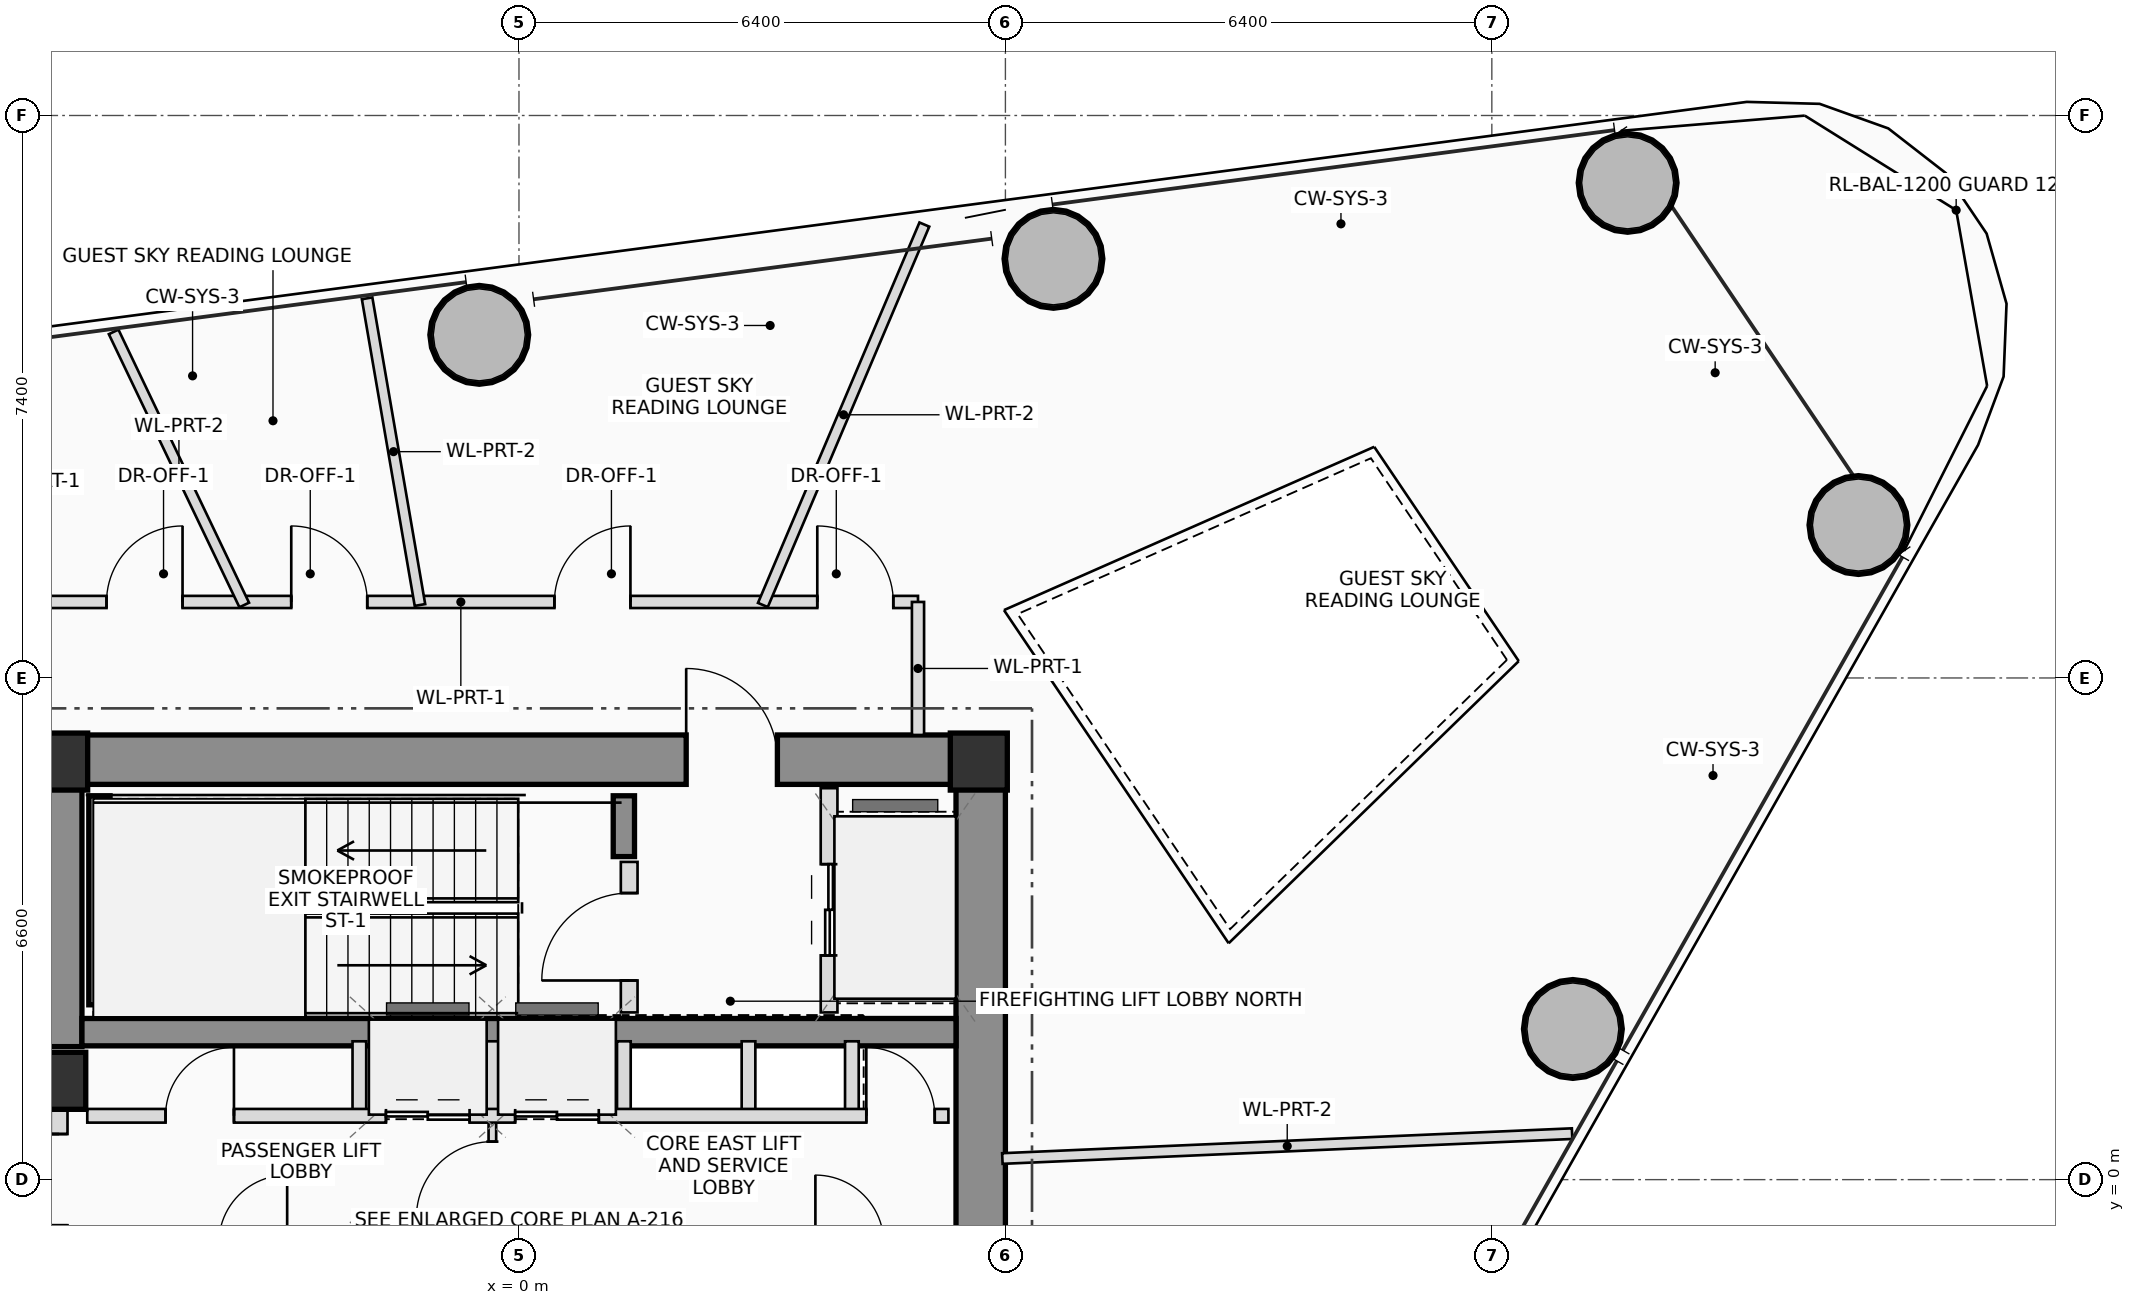
"""IFC4 building model, lengths in metres.
Left out: names, types, materials, properties, quantities, classifications, styles, units other than length and angle.
Written with IfcOpenShell. Run it as: python <this file> out.ifc"""

import sys

from ifc_helpers import new_model, si_unit, direction, frame, frame_2d, origin, origin_2d, place, context, subcontext, project, spatial, rectangle, hollow_circle, extrude, source, transform, mapped, element, fill, save


model = new_model("IFC4")
c1 = context("Model", 3, precision=1e-05, world=origin(), true_north=direction((0.0, 1.0)))
c2 = subcontext(c1, "Body", "Model", "MODEL_VIEW")
j1 = project(units=[si_unit("LENGTHUNIT", "METRE"), si_unit("PLANEANGLEUNIT", "RADIAN")], contexts=[c1])
p1 = place(None, origin())
s1 = spatial("IfcSite", under=j1, at=p1, CompositionType="ELEMENT")
p2 = place(p1, origin())
s2 = spatial("IfcBuilding", under=s1, at=p2, CompositionType="ELEMENT")
p3 = place(p2, frame((0.0, 0.0, 179.45)))
s3 = spatial("IfcBuildingStorey", under=s2, at=p3, CompositionType="ELEMENT", Elevation=179.45)
m1 = source(origin(), c2, "Body", "SweptSolid", [
    extrude(rectangle(XDim=0.75, YDim=0.75, at=origin_2d()), origin(), (0.0, 0.0, 1.0), 3.45),
])
for number, where, z_axis, x_axis in (
    (1, (6.05, 5.5, 0.0), (0.0, 0.0, 1.0), (1.0, 0.0, 0.0)),
    (2, (-6.05, 5.5, 0.0), (0.0, 0.0, 1.0), (1.0, 0.0, 0.0)),
):
    element("IfcColumn", number, at=place(p3, frame(where, z_axis=z_axis, x_axis=x_axis)), inside=s3, PredefinedType="COLUMN", context=c2, shape_type="MappedRepresentation", body=[
        mapped(m1, transform((0.0, 0.0, 0.0), scale=1.0)),
    ])
p4 = place(p3, frame((-6.4, 5.525, 0.0), z_axis=(0.0, 0.0, 1.0), x_axis=(1.0, 0.0, 0.0)))
e3 = element("IfcWall", 3, at=p4, inside=s3, PredefinedType="SHEAR", context=c2, shape_type="SweptSolid", body=[
    extrude(rectangle(XDim=12.8, YDim=0.65, at=frame_2d((6.4, 0.0))), origin(), (0.0, 0.0, 1.0), 3.45),
])
p5 = place(p4, frame((8.6, 0.0, 0.0)))
e4 = element("IfcOpeningElement", 4, at=p5, cuts=e3, PredefinedType="OPENING", context=c2, shape_type="SweptSolid", body=[
    extrude(rectangle(XDim=1.2, YDim=2.2, at=frame_2d((0.6, 1.1))), frame((0.0, 0.335, 0.0), z_axis=(0.0, -1.0, 0.0), x_axis=(1.0, 0.0, 0.0)), (0.0, 0.0, 1.0), 0.67),
])
p6 = place(p3, frame((6.075, -5.2, 0.0), z_axis=(0.0, 0.0, 1.0), x_axis=(0.0, 1.0, 0.0)))
e5 = element("IfcWall", 5, at=p6, inside=s3, PredefinedType="SHEAR", context=c2, shape_type="SweptSolid", body=[
    extrude(rectangle(XDim=10.4, YDim=0.65, at=frame_2d((5.2, 0.0))), origin(), (0.0, 0.0, 1.0), 3.45),
])
p7 = place(p3, frame((-6.075, 1.75, 0.0), z_axis=(0.0, 0.0, 1.0), x_axis=(0.0, 1.0, 0.0)))
e6 = element("IfcWall", 6, at=p7, inside=s3, PredefinedType="SHEAR", context=c2, shape_type="SweptSolid", body=[
    extrude(rectangle(XDim=3.45, YDim=0.65, at=frame_2d((1.725, 0.0))), origin(), (0.0, 0.0, 1.0), 3.45),
])
p8 = place(p3, frame((-5.75, 1.94, 0.0), z_axis=(0.0, 0.0, 1.0), x_axis=(1.0, 0.0, 0.0)))
e7 = element("IfcWall", 7, at=p8, inside=s3, PredefinedType="SHEAR", context=c2, shape_type="SweptSolid", body=[
    extrude(rectangle(XDim=11.5, YDim=0.36, at=frame_2d((5.75, 0.0))), origin(), (0.0, 0.0, 1.0), 3.45),
])
p9 = place(p3, frame((-5.52, 2.3, 0.0), z_axis=(0.0, 0.0, 1.0), x_axis=(0.0, 1.0, 0.0)))
e8 = element("IfcWall", 8, at=p9, inside=s3, PredefinedType="SHEAR", context=c2, shape_type="SweptSolid", body=[
    extrude(rectangle(XDim=2.75, YDim=0.28, at=frame_2d((1.375, 0.0))), origin(), (0.0, 0.0, 1.0), 3.45),
])
p10 = place(p3, frame((1.38, 4.25, 0.0), z_axis=(0.0, 0.0, 1.0), x_axis=(0.0, 1.0, 0.0)))
e9 = element("IfcWall", 9, at=p10, inside=s3, PredefinedType="SHEAR", context=c2, shape_type="SweptSolid", body=[
    extrude(rectangle(XDim=0.8, YDim=0.28, at=frame_2d((0.4, 0.0))), origin(), (0.0, 0.0, 1.0), 3.45),
])
p11 = place(p3, frame((-6.075, 1.3, 0.0), z_axis=(0.0, 0.0, 1.0), x_axis=(1.0, 0.0, 0.0)))
e10 = element("IfcColumn", 10, at=p11, inside=s3, PredefinedType="COLUMN", context=c2, shape_type="MappedRepresentation", body=[
    mapped(m1, transform((0.0, 0.0, 0.0), scale=1.0)),
])
m2 = source(origin(), c2, "Body", "SweptSolid", [
    extrude(hollow_circle(Radius=0.65, WallThickness=0.045, at=origin_2d()), origin(), (0.0, 0.0, 1.0), 3.45),
])
for number, where, z_axis, x_axis in (
    (11, (13.866, 1.982, 0.0), (0.0, 0.0, 1.0), (1.0, 0.0, 0.0)),
    (12, (17.624, 8.612, 0.0), (0.0, 0.0, 1.0), (1.0, 0.0, 0.0)),
    (13, (14.587, 13.114, 0.0), (0.0, 0.0, 1.0), (1.0, 0.0, 0.0)),
    (14, (7.032, 12.114, 0.0), (0.0, 0.0, 1.0), (1.0, 0.0, 0.0)),
    (15, (-0.522, 11.114, 0.0), (0.0, 0.0, 1.0), (1.0, 0.0, 0.0)),
):
    element("IfcColumn", number, at=place(p3, frame(where, z_axis=z_axis, x_axis=x_axis)), inside=s3, PredefinedType="COLUMN", context=c2, shape_type="MappedRepresentation", body=[
        mapped(m2, transform((0.0, 0.0, 0.0), scale=1.0)),
    ])
p12 = place(p3, frame((-6.05, -0.95, 0.0), z_axis=(0.0, 0.0, 1.0), x_axis=(0.0, 1.0, 0.0)))
e16 = element("IfcWall", 16, at=p12, inside=s3, PredefinedType="PLUMBINGWALL", context=c2, shape_type="SweptSolid", body=[
    extrude(rectangle(XDim=1.9, YDim=0.22, at=frame_2d((0.95, 0.0))), origin(), (0.0, 0.0, 1.0), 2.23),
])
p13 = place(p12, frame((0.35, 0.0, 0.0)))
e17 = element("IfcOpeningElement", 17, at=p13, cuts=e16, PredefinedType="OPENING", context=c2, shape_type="SweptSolid", body=[
    extrude(rectangle(XDim=1.2, YDim=2.2, at=frame_2d((0.6, 1.1))), frame((0.0, 0.12, 0.0), z_axis=(0.0, -1.0, 0.0), x_axis=(1.0, 0.0, 0.0)), (0.0, 0.0, 1.0), 0.24),
])
p14 = place(p3, frame((1.45, 2.2, 0.0), z_axis=(0.0, 0.0, 1.0), x_axis=(0.0, 1.0, 0.0)))
e18 = element("IfcWall", 18, at=p14, inside=s3, PredefinedType="PLUMBINGWALL", context=c2, shape_type="SweptSolid", body=[
    extrude(rectangle(XDim=1.98, YDim=0.22, at=frame_2d((0.99, 0.0))), origin(), (0.0, 0.0, 1.0), 3.25),
])
p15 = place(p14, frame((0.42, 0.0, 0.0)))
e19 = element("IfcOpeningElement", 19, at=p15, cuts=e18, PredefinedType="OPENING", context=c2, shape_type="SweptSolid", body=[
    extrude(rectangle(XDim=1.15, YDim=2.15, at=frame_2d((0.575, 1.075))), frame((0.0, 0.12, 0.0), z_axis=(0.0, -1.0, 0.0), x_axis=(1.0, 0.0, 0.0)), (0.0, 0.0, 1.0), 0.24),
])
p16 = place(p3, frame((4.08, 2.2, 0.0), z_axis=(0.0, 0.0, 1.0), x_axis=(0.0, 1.0, 0.0)))
e20 = element("IfcWall", 20, at=p16, inside=s3, PredefinedType="PLUMBINGWALL", context=c2, shape_type="SweptSolid", body=[
    extrude(rectangle(XDim=2.95, YDim=0.22, at=frame_2d((1.475, 0.0))), origin(), (0.0, 0.0, 1.0), 3.25),
])
p17 = place(p16, frame((0.75, 0.0, 0.0)))
e21 = element("IfcOpeningElement", 21, at=p17, cuts=e20, PredefinedType="OPENING", context=c2, shape_type="SweptSolid", body=[
    extrude(rectangle(XDim=1.2, YDim=2.25, at=frame_2d((0.6, 1.125))), frame((0.0, 0.12, 0.0), z_axis=(0.0, -1.0, 0.0), x_axis=(1.0, 0.0, 0.0)), (0.0, 0.0, 1.0), 0.24),
])
p18 = place(p3, frame((-0.35, -0.84, 0.0), z_axis=(0.0, 0.0, 1.0), x_axis=(0.0, 1.0, 0.0)))
e22 = element("IfcWall", 22, at=p18, inside=s3, PredefinedType="PARTITIONING", context=c2, shape_type="SweptSolid", body=[
    extrude(rectangle(XDim=1.68, YDim=0.1, at=frame_2d((0.84, 0.0))), origin(), (0.0, 0.0, 1.0), 3.25),
])
p19 = place(p18, frame((0.34, 0.0, 0.0)))
e23 = element("IfcOpeningElement", 23, at=p19, cuts=e22, PredefinedType="OPENING", context=c2, shape_type="SweptSolid", body=[
    extrude(rectangle(XDim=1.0, YDim=2.25, at=frame_2d((0.5, 1.125))), frame((0.0, 0.06, 0.0), z_axis=(0.0, -1.0, 0.0), x_axis=(1.0, 0.0, 0.0)), (0.0, 0.0, 1.0), 0.12),
])
for number, where, z_axis, x_axis in (
    (24, (-2.1, 0.84, 0.0), (0.0, 0.0, 1.0), (0.0, 1.0, 0.0)),
    (25, (-0.35, 0.84, 0.0), (0.0, 0.0, 1.0), (0.0, 1.0, 0.0)),
    (26, (1.38, 0.84, 0.0), (0.0, 0.0, 1.0), (0.0, 1.0, 0.0)),
    (27, (3.02, 0.84, 0.0), (0.0, 0.0, 1.0), (0.0, 1.0, 0.0)),
    (28, (4.38, 0.84, 0.0), (0.0, 0.0, 1.0), (0.0, 1.0, 0.0)),
):
    element("IfcWall", number, at=place(p3, frame(where, z_axis=z_axis, x_axis=x_axis)), inside=s3, PredefinedType="PLUMBINGWALL", context=c2, shape_type="SweptSolid", body=[
        extrude(rectangle(XDim=0.98, YDim=0.18, at=frame_2d((0.49, 0.0))), origin(), (0.0, 0.0, 1.0), 3.25),
    ])
p20 = place(p3, frame((-5.68, 0.84, 0.0), z_axis=(0.0, 0.0, 1.0), x_axis=(1.0, 0.0, 0.0)))
e29 = element("IfcWall", 29, at=p20, inside=s3, PredefinedType="PLUMBINGWALL", context=c2, shape_type="SweptSolid", body=[
    extrude(rectangle(XDim=11.33, YDim=0.18, at=frame_2d((5.665, 0.0))), origin(), (0.0, 0.0, 1.0), 3.25),
])
p21 = place(p20, frame((1.03, 0.0, 0.0)))
e30 = element("IfcOpeningElement", 30, at=p21, cuts=e29, PredefinedType="OPENING", context=c2, shape_type="SweptSolid", body=[
    extrude(rectangle(XDim=0.9, YDim=2.05, at=frame_2d((0.45, 1.025))), frame((0.0, 0.1, 0.0), z_axis=(0.0, -1.0, 0.0), x_axis=(1.0, 0.0, 0.0)), (0.0, 0.0, 1.0), 0.2),
])
p22 = place(p20, frame((3.93, 0.0, 0.0)))
e31 = element("IfcOpeningElement", 31, at=p22, cuts=e29, PredefinedType="OPENING", context=c2, shape_type="SweptSolid", body=[
    extrude(rectangle(XDim=1.1, YDim=2.2, at=frame_2d((0.55, 1.1))), frame((0.0, 0.1, 0.0), z_axis=(0.0, -1.0, 0.0), x_axis=(1.0, 0.0, 0.0)), (0.0, 0.0, 1.0), 0.2),
])
p23 = place(p20, frame((5.63, 0.0, 0.0)))
e32 = element("IfcOpeningElement", 32, at=p23, cuts=e29, PredefinedType="OPENING", context=c2, shape_type="SweptSolid", body=[
    extrude(rectangle(XDim=1.1, YDim=2.2, at=frame_2d((0.55, 1.1))), frame((0.0, 0.1, 0.0), z_axis=(0.0, -1.0, 0.0), x_axis=(1.0, 0.0, 0.0)), (0.0, 0.0, 1.0), 0.2),
])
p24 = place(p20, frame((10.25, 0.0, 0.0)))
e33 = element("IfcOpeningElement", 33, at=p24, cuts=e29, PredefinedType="OPENING", context=c2, shape_type="SweptSolid", body=[
    extrude(rectangle(XDim=0.9, YDim=2.05, at=frame_2d((0.45, 1.025))), frame((0.0, 0.1, 0.0), z_axis=(0.0, -1.0, 0.0), x_axis=(1.0, 0.0, 0.0)), (0.0, 0.0, 1.0), 0.2),
])
p25 = place(p3, frame((-6.36, 7.6, 0.0), z_axis=(0.0, 0.0, 1.0), x_axis=(1.0, 0.0, 0.0)))
e34 = element("IfcWall", 34, at=p25, inside=s3, PredefinedType="PARTITIONING", context=c2, shape_type="SweptSolid", body=[
    extrude(rectangle(XDim=11.61, YDim=0.16, at=frame_2d((5.805, 0.0))), origin(), (0.0, 0.0, 1.0), 2.605),
])
p26 = place(p25, frame((0.934, 0.0, 0.0)))
e35 = element("IfcOpeningElement", 35, at=p26, cuts=e34, PredefinedType="OPENING", context=c2, shape_type="SweptSolid", body=[
    extrude(rectangle(XDim=1.0, YDim=2.25, at=frame_2d((0.5, 1.125))), frame((0.0, 0.09, 0.0), z_axis=(0.0, -1.0, 0.0), x_axis=(1.0, 0.0, 0.0)), (0.0, 0.0, 1.0), 0.18),
])
p27 = place(p25, frame((3.364, 0.0, 0.0)))
e36 = element("IfcOpeningElement", 36, at=p27, cuts=e34, PredefinedType="OPENING", context=c2, shape_type="SweptSolid", body=[
    extrude(rectangle(XDim=1.0, YDim=2.25, at=frame_2d((0.5, 1.125))), frame((0.0, 0.09, 0.0), z_axis=(0.0, -1.0, 0.0), x_axis=(1.0, 0.0, 0.0)), (0.0, 0.0, 1.0), 0.18),
])
p28 = place(p25, frame((6.826, 0.0, 0.0)))
e37 = element("IfcOpeningElement", 37, at=p28, cuts=e34, PredefinedType="OPENING", context=c2, shape_type="SweptSolid", body=[
    extrude(rectangle(XDim=1.0, YDim=2.25, at=frame_2d((0.5, 1.125))), frame((0.0, 0.09, 0.0), z_axis=(0.0, -1.0, 0.0), x_axis=(1.0, 0.0, 0.0)), (0.0, 0.0, 1.0), 0.18),
])
p29 = place(p25, frame((10.285, 0.0, 0.0)))
e38 = element("IfcOpeningElement", 38, at=p29, cuts=e34, PredefinedType="OPENING", context=c2, shape_type="SweptSolid", body=[
    extrude(rectangle(XDim=1.0, YDim=2.25, at=frame_2d((0.5, 1.125))), frame((0.0, 0.09, 0.0), z_axis=(0.0, -1.0, 0.0), x_axis=(1.0, 0.0, 0.0)), (0.0, 0.0, 1.0), 0.18),
])
p30 = place(p3, frame((5.25, 7.6, 0.0), z_axis=(0.0, 0.0, 1.0), x_axis=(0.0, -1.0, 0.0)))
e39 = element("IfcWall", 39, at=p30, inside=s3, PredefinedType="PARTITIONING", context=c2, shape_type="SweptSolid", body=[
    extrude(rectangle(XDim=1.75, YDim=0.16, at=frame_2d((0.875, 0.0))), origin(), (0.0, 0.0, 1.0), 3.25),
])
p31 = place(p3, frame((6.36, 0.278, 0.0), z_axis=(0.0, 0.0, 1.0), x_axis=(0.999047543566, 0.043634913719, 0.0)))
e40 = element("IfcWall", 40, at=p31, inside=s3, PredefinedType="PARTITIONING", context=c2, shape_type="SweptSolid", body=[
    extrude(rectangle(XDim=7.503, YDim=0.14, at=frame_2d((3.751, 0.0))), origin(), (0.0, 0.0, 1.0), 2.605),
])
p32 = place(p3, frame((3.209, 7.56, 0.0), z_axis=(0.0, 0.0, 1.0), x_axis=(0.390725109397, 0.920507408382, 0.0)))
e41 = element("IfcWall", 41, at=p32, inside=s3, PredefinedType="PARTITIONING", context=c2, shape_type="SweptSolid", body=[
    extrude(rectangle(XDim=5.437, YDim=0.14, at=frame_2d((2.719, 0.0))), origin(), (0.0, 0.0, 1.0), 2.605),
])
p33 = place(p3, frame((-1.303, 7.56, 0.0), z_axis=(0.0, 0.0, 1.0), x_axis=(-0.169831033654, 0.985473195987, 0.0)))
e42 = element("IfcWall", 42, at=p33, inside=s3, PredefinedType="PARTITIONING", context=c2, shape_type="SweptSolid", body=[
    extrude(rectangle(XDim=4.094, YDim=0.14, at=frame_2d((2.047, 0.0))), origin(), (0.0, 0.0, 1.0), 2.605),
])
p34 = place(p3, frame((-3.615, 7.56, 0.0), z_axis=(0.0, 0.0, 1.0), x_axis=(-0.431353551372, 0.902182971308, 0.0)))
e43 = element("IfcWall", 43, at=p34, inside=s3, PredefinedType="PARTITIONING", context=c2, shape_type="SweptSolid", body=[
    extrude(rectangle(XDim=3.983, YDim=0.14, at=frame_2d((1.991, 0.0))), origin(), (0.0, 0.0, 1.0), 2.605),
])
p35 = place(p5, origin())
e44 = element("IfcDoor", 44, at=p35, inside=s3, OperationType="SINGLE_SWING_LEFT", PredefinedType="DOOR", context=c2, shape_type="SweptSolid", body=[
    extrude(rectangle(XDim=1.2, YDim=2.2, at=frame_2d((0.6, 1.1))), frame((0.0, 0.025, 0.0), z_axis=(0.0, -1.0, 0.0), x_axis=(1.0, 0.0, 0.0)), (0.0, 0.0, 1.0), 0.05),
])
fill(e4, e44)
p36 = place(p13, origin())
e45 = element("IfcDoor", 45, at=p36, inside=s3, OperationType="SINGLE_SWING_RIGHT", PredefinedType="DOOR", context=c2, shape_type="SweptSolid", body=[
    extrude(rectangle(XDim=1.2, YDim=2.2, at=frame_2d((0.6, 1.1))), frame((0.0, 0.025, 0.0), z_axis=(0.0, -1.0, 0.0), x_axis=(1.0, 0.0, 0.0)), (0.0, 0.0, 1.0), 0.05),
])
fill(e17, e45)
p37 = place(p15, origin())
e46 = element("IfcDoor", 46, at=p37, inside=s3, OperationType="SINGLE_SWING_LEFT", PredefinedType="DOOR", context=c2, shape_type="SweptSolid", body=[
    extrude(rectangle(XDim=1.15, YDim=2.15, at=frame_2d((0.575, 1.075))), frame((0.0, 0.025, 0.0), z_axis=(0.0, -1.0, 0.0), x_axis=(1.0, 0.0, 0.0)), (0.0, 0.0, 1.0), 0.05),
])
fill(e19, e46)
p38 = place(p17, origin())
e47 = element("IfcDoor", 47, at=p38, inside=s3, OperationType="DOUBLE_DOOR_SLIDING", PredefinedType="DOOR", context=c2, shape_type="SweptSolid", body=[
    extrude(rectangle(XDim=1.2, YDim=2.25, at=frame_2d((0.6, 1.125))), frame((0.0, 0.025, 0.0), z_axis=(0.0, -1.0, 0.0), x_axis=(1.0, 0.0, 0.0)), (0.0, 0.0, 1.0), 0.05),
])
fill(e21, e47)
p39 = place(p19, origin())
e48 = element("IfcDoor", 48, at=p39, inside=s3, OperationType="SINGLE_SWING_LEFT", PredefinedType="DOOR", context=c2, shape_type="SweptSolid", body=[
    extrude(rectangle(XDim=1.0, YDim=2.25, at=frame_2d((0.5, 1.125))), frame((0.0, 0.025, 0.0), z_axis=(0.0, -1.0, 0.0), x_axis=(1.0, 0.0, 0.0)), (0.0, 0.0, 1.0), 0.05),
])
fill(e23, e48)
p40 = place(p21, origin())
e49 = element("IfcDoor", 49, at=p40, inside=s3, OperationType="SINGLE_SWING_RIGHT", PredefinedType="DOOR", context=c2, shape_type="SweptSolid", body=[
    extrude(rectangle(XDim=0.9, YDim=2.05, at=frame_2d((0.45, 1.025))), frame((0.0, 0.025, 0.0), z_axis=(0.0, -1.0, 0.0), x_axis=(1.0, 0.0, 0.0)), (0.0, 0.0, 1.0), 0.05),
])
fill(e30, e49)
p41 = place(p22, origin())
e50 = element("IfcDoor", 50, at=p41, inside=s3, OperationType="DOUBLE_DOOR_SLIDING", PredefinedType="DOOR", context=c2, shape_type="SweptSolid", body=[
    extrude(rectangle(XDim=1.1, YDim=2.2, at=frame_2d((0.55, 1.1))), frame((0.0, 0.025, 0.0), z_axis=(0.0, -1.0, 0.0), x_axis=(1.0, 0.0, 0.0)), (0.0, 0.0, 1.0), 0.05),
])
fill(e31, e50)
p42 = place(p23, origin())
e51 = element("IfcDoor", 51, at=p42, inside=s3, OperationType="DOUBLE_DOOR_SLIDING", PredefinedType="DOOR", context=c2, shape_type="SweptSolid", body=[
    extrude(rectangle(XDim=1.1, YDim=2.2, at=frame_2d((0.55, 1.1))), frame((0.0, 0.025, 0.0), z_axis=(0.0, -1.0, 0.0), x_axis=(1.0, 0.0, 0.0)), (0.0, 0.0, 1.0), 0.05),
])
fill(e32, e51)
p43 = place(p24, origin())
e52 = element("IfcDoor", 52, at=p43, inside=s3, OperationType="SINGLE_SWING_LEFT", PredefinedType="DOOR", context=c2, shape_type="SweptSolid", body=[
    extrude(rectangle(XDim=0.9, YDim=2.05, at=frame_2d((0.45, 1.025))), frame((0.0, 0.025, 0.0), z_axis=(0.0, -1.0, 0.0), x_axis=(1.0, 0.0, 0.0)), (0.0, 0.0, 1.0), 0.05),
])
fill(e33, e52)
p44 = place(p26, origin())
e53 = element("IfcDoor", 53, at=p44, inside=s3, OperationType="SINGLE_SWING_RIGHT", PredefinedType="DOOR", context=c2, shape_type="SweptSolid", body=[
    extrude(rectangle(XDim=1.0, YDim=2.25, at=frame_2d((0.5, 1.125))), frame((0.0, 0.025, 0.0), z_axis=(0.0, -1.0, 0.0), x_axis=(1.0, 0.0, 0.0)), (0.0, 0.0, 1.0), 0.05),
])
fill(e35, e53)
p45 = place(p27, origin())
e54 = element("IfcDoor", 54, at=p45, inside=s3, OperationType="SINGLE_SWING_LEFT", PredefinedType="DOOR", context=c2, shape_type="SweptSolid", body=[
    extrude(rectangle(XDim=1.0, YDim=2.25, at=frame_2d((0.5, 1.125))), frame((0.0, 0.025, 0.0), z_axis=(0.0, -1.0, 0.0), x_axis=(1.0, 0.0, 0.0)), (0.0, 0.0, 1.0), 0.05),
])
fill(e36, e54)
p46 = place(p28, origin())
e55 = element("IfcDoor", 55, at=p46, inside=s3, OperationType="SINGLE_SWING_RIGHT", PredefinedType="DOOR", context=c2, shape_type="SweptSolid", body=[
    extrude(rectangle(XDim=1.0, YDim=2.25, at=frame_2d((0.5, 1.125))), frame((0.0, 0.025, 0.0), z_axis=(0.0, -1.0, 0.0), x_axis=(1.0, 0.0, 0.0)), (0.0, 0.0, 1.0), 0.05),
])
fill(e37, e55)
p47 = place(p29, origin())
e56 = element("IfcDoor", 56, at=p47, inside=s3, OperationType="SINGLE_SWING_LEFT", PredefinedType="DOOR", context=c2, shape_type="SweptSolid", body=[
    extrude(rectangle(XDim=1.0, YDim=2.25, at=frame_2d((0.5, 1.125))), frame((0.0, 0.025, 0.0), z_axis=(0.0, -1.0, 0.0), x_axis=(1.0, 0.0, 0.0)), (0.0, 0.0, 1.0), 0.05),
])
fill(e38, e56)
save(model, sys.argv[1])
